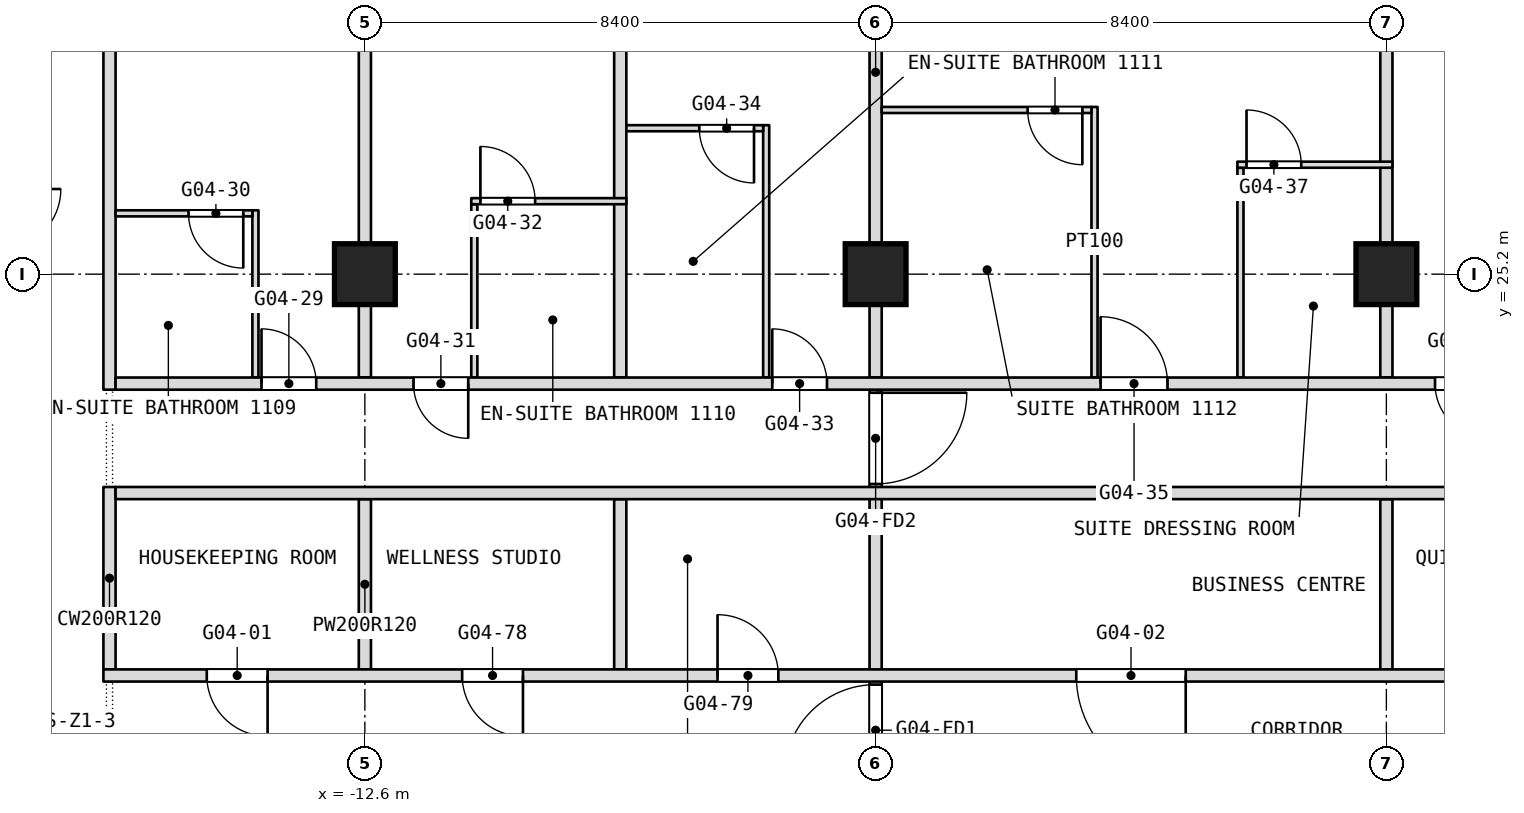
"""IFC4 building model, lengths in metres.
Left out: names, types, materials, properties, quantities, classifications, styles, units other than length and angle.
Written with IfcOpenShell. Run it as: python <this file> out.ifc"""

import sys

from ifc_helpers import new_model, si_unit, direction, frame, frame_2d, origin, origin_2d, place, context, subcontext, project, spatial, rectangle, extrude, element, fill, save


model = new_model("IFC4")
c1 = context("Model", 3, precision=1e-05, world=origin(), true_north=direction((0.0, 1.0)))
c2 = subcontext(c1, "Body", "Model", "MODEL_VIEW")
j1 = project(units=[si_unit("LENGTHUNIT", "METRE"), si_unit("PLANEANGLEUNIT", "RADIAN")], contexts=[c1])
p1 = place(None, origin())
s1 = spatial("IfcSite", under=j1, at=p1, CompositionType="ELEMENT")
p2 = place(p1, origin())
s2 = spatial("IfcBuilding", under=s1, at=p2, CompositionType="ELEMENT")
p3 = place(p2, frame((0.0, 0.0, 54.5)))
s3 = spatial("IfcBuildingStorey", under=s2, at=p3, CompositionType="ELEMENT", Elevation=54.5)
for number, where, z_axis, x_axis in (
    (1, (-12.6, 25.2, 0.0), (0.0, 0.0, 1.0), (1.0, 0.0, 0.0)),
    (2, (-4.2, 25.2, 0.0), (0.0, 0.0, 1.0), (1.0, 0.0, 0.0)),
    (3, (4.2, 25.2, 0.0), (0.0, 0.0, 1.0), (1.0, 0.0, 0.0)),
):
    element("IfcColumn", number, at=place(p3, frame(where, z_axis=z_axis, x_axis=x_axis)), inside=s3, PredefinedType="COLUMN", context=c2, shape_type="SweptSolid", body=[
        extrude(rectangle(XDim=1.0, YDim=1.0, at=origin_2d()), origin(), (0.0, 0.0, 1.0), 3.6),
    ])
p4 = place(p3, frame((4.2, 18.7, 0.0), z_axis=(0.0, 0.0, 1.0), x_axis=(0.0, 1.0, 0.0)))
e4 = element("IfcWall", 4, at=p4, inside=s3, PredefinedType="PARTITIONING", context=c2, shape_type="SweptSolid", body=[
    extrude(rectangle(XDim=2.8, YDim=0.2, at=frame_2d((1.4, 0.0))), origin(), (0.0, 0.0, 1.0), 3.34),
])
p5 = place(p3, frame((4.2, 23.5, 0.0), z_axis=(0.0, 0.0, 1.0), x_axis=(0.0, 1.0, 0.0)))
e5 = element("IfcWall", 5, at=p5, inside=s3, PredefinedType="PARTITIONING", context=c2, shape_type="SweptSolid", body=[
    extrude(rectangle(XDim=10.04, YDim=0.2, at=frame_2d((5.02, 0.0))), origin(), (0.0, 0.0, 1.0), 3.34),
])
p6 = place(p3, frame((1.8, 23.5, 0.0), z_axis=(0.0, 0.0, 1.0), x_axis=(0.0, 1.0, 0.0)))
e6 = element("IfcWall", 6, at=p6, inside=s3, PredefinedType="PARTITIONING", context=c2, shape_type="SweptSolid", body=[
    extrude(rectangle(XDim=3.45, YDim=0.1, at=frame_2d((1.725, 0.0))), origin(), (0.0, 0.0, 1.0), 3.34),
])
p7 = place(p3, frame((-0.6, 23.5, 0.0), z_axis=(0.0, 0.0, 1.0), x_axis=(0.0, 1.0, 0.0)))
e7 = element("IfcWall", 7, at=p7, inside=s3, PredefinedType="PARTITIONING", context=c2, shape_type="SweptSolid", body=[
    extrude(rectangle(XDim=4.45, YDim=0.1, at=frame_2d((2.225, 0.0))), origin(), (0.0, 0.0, 1.0), 3.34),
])
p8 = place(p3, frame((-4.2, 16.8, 0.0), z_axis=(0.0, 0.0, 1.0), x_axis=(0.0, 1.0, 0.0)))
e8 = element("IfcWall", 8, at=p8, inside=s3, PredefinedType="PARTITIONING", context=c2, shape_type="SweptSolid", body=[
    extrude(rectangle(XDim=6.7, YDim=0.2, at=frame_2d((3.35, 0.0))), origin(), (0.0, 0.0, 1.0), 3.34),
])
p9 = place(p8, frame((0.15, 0.0, 0.0)))
e9 = element("IfcOpeningElement", 9, at=p9, cuts=e8, PredefinedType="OPENING", context=c2, shape_type="SweptSolid", body=[
    extrude(rectangle(XDim=1.5, YDim=2.1, at=frame_2d((0.75, 1.05))), frame((0.0, 0.1, 0.0), z_axis=(0.0, -1.0, 0.0), x_axis=(1.0, 0.0, 0.0)), (0.0, 0.0, 1.0), 0.2),
])
p10 = place(p8, frame((4.95, 0.0, 0.0)))
e10 = element("IfcOpeningElement", 10, at=p10, cuts=e8, PredefinedType="OPENING", context=c2, shape_type="SweptSolid", body=[
    extrude(rectangle(XDim=1.5, YDim=2.1, at=frame_2d((0.75, 1.05))), frame((0.0, 0.1, 0.0), z_axis=(0.0, -1.0, 0.0), x_axis=(1.0, 0.0, 0.0)), (0.0, 0.0, 1.0), 0.2),
])
p11 = place(p3, frame((-4.2, 23.5, 0.0), z_axis=(0.0, 0.0, 1.0), x_axis=(0.0, 1.0, 0.0)))
e11 = element("IfcWall", 11, at=p11, inside=s3, PredefinedType="PARTITIONING", context=c2, shape_type="SweptSolid", body=[
    extrude(rectangle(XDim=10.04, YDim=0.2, at=frame_2d((5.02, 0.0))), origin(), (0.0, 0.0, 1.0), 3.34),
])
p12 = place(p3, frame((-6.0, 23.5, 0.0), z_axis=(0.0, 0.0, 1.0), x_axis=(0.0, 1.0, 0.0)))
e12 = element("IfcWall", 12, at=p12, inside=s3, PredefinedType="PARTITIONING", context=c2, shape_type="SweptSolid", body=[
    extrude(rectangle(XDim=4.15, YDim=0.1, at=frame_2d((2.075, 0.0))), origin(), (0.0, 0.0, 1.0), 3.34),
])
p13 = place(p3, frame((-8.4, 18.7, 0.0), z_axis=(0.0, 0.0, 1.0), x_axis=(0.0, 1.0, 0.0)))
e13 = element("IfcWall", 13, at=p13, inside=s3, PredefinedType="PARTITIONING", context=c2, shape_type="SweptSolid", body=[
    extrude(rectangle(XDim=2.8, YDim=0.2, at=frame_2d((1.4, 0.0))), origin(), (0.0, 0.0, 1.0), 3.34),
])
p14 = place(p3, frame((-8.4, 23.5, 0.0), z_axis=(0.0, 0.0, 1.0), x_axis=(0.0, 1.0, 0.0)))
e14 = element("IfcWall", 14, at=p14, inside=s3, PredefinedType="PARTITIONING", context=c2, shape_type="SweptSolid", body=[
    extrude(rectangle(XDim=10.04, YDim=0.2, at=frame_2d((5.02, 0.0))), origin(), (0.0, 0.0, 1.0), 3.34),
])
p15 = place(p3, frame((-10.8, 23.5, 0.0), z_axis=(0.0, 0.0, 1.0), x_axis=(0.0, 1.0, 0.0)))
e15 = element("IfcWall", 15, at=p15, inside=s3, PredefinedType="PARTITIONING", context=c2, shape_type="SweptSolid", body=[
    extrude(rectangle(XDim=2.85, YDim=0.1, at=frame_2d((1.425, 0.0))), origin(), (0.0, 0.0, 1.0), 3.34),
])
p16 = place(p3, frame((-12.6, 18.7, 0.0), z_axis=(0.0, 0.0, 1.0), x_axis=(0.0, 1.0, 0.0)))
e16 = element("IfcWall", 16, at=p16, inside=s3, PredefinedType="PARTITIONING", context=c2, shape_type="SweptSolid", body=[
    extrude(rectangle(XDim=2.8, YDim=0.2, at=frame_2d((1.4, 0.0))), origin(), (0.0, 0.0, 1.0), 3.34),
])
p17 = place(p3, frame((-12.6, 23.5, 0.0), z_axis=(0.0, 0.0, 1.0), x_axis=(0.0, 1.0, 0.0)))
e17 = element("IfcWall", 17, at=p17, inside=s3, PredefinedType="PARTITIONING", context=c2, shape_type="SweptSolid", body=[
    extrude(rectangle(XDim=10.04, YDim=0.2, at=frame_2d((5.02, 0.0))), origin(), (0.0, 0.0, 1.0), 3.34),
])
p18 = place(p3, frame((-14.4, 23.5, 0.0), z_axis=(0.0, 0.0, 1.0), x_axis=(0.0, 1.0, 0.0)))
e18 = element("IfcWall", 18, at=p18, inside=s3, PredefinedType="PARTITIONING", context=c2, shape_type="SweptSolid", body=[
    extrude(rectangle(XDim=2.75, YDim=0.1, at=frame_2d((1.375, 0.0))), origin(), (0.0, 0.0, 1.0), 3.34),
])
p19 = place(p3, frame((-16.8, 18.7, 0.0), z_axis=(0.0, 0.0, 1.0), x_axis=(0.0, 1.0, 0.0)))
e19 = element("IfcWall", 19, at=p19, inside=s3, PredefinedType="PARTITIONING", context=c2, shape_type="SweptSolid", body=[
    extrude(rectangle(XDim=3.0, YDim=0.2, at=frame_2d((1.5, 0.0))), origin(), (0.0, 0.0, 1.0), 3.34),
])
p20 = place(p3, frame((-16.8, 23.3, 0.0), z_axis=(0.0, 0.0, 1.0), x_axis=(0.0, 1.0, 0.0)))
e20 = element("IfcWall", 20, at=p20, inside=s3, PredefinedType="PARTITIONING", context=c2, shape_type="SweptSolid", body=[
    extrude(rectangle(XDim=10.24, YDim=0.2, at=frame_2d((5.12, 0.0))), origin(), (0.0, 0.0, 1.0), 3.34),
])
p21 = place(p3, frame((-16.9, 18.6, 0.0), z_axis=(0.0, 0.0, 1.0), x_axis=(1.0, 0.0, 0.0)))
e21 = element("IfcWall", 21, at=p21, inside=s3, PredefinedType="PARTITIONING", context=c2, shape_type="SweptSolid", body=[
    extrude(rectangle(XDim=25.1, YDim=0.2, at=frame_2d((12.55, 0.0))), origin(), (0.0, 0.0, 1.0), 3.34),
])
p22 = place(p21, frame((1.7, 0.0, 0.0)))
e22 = element("IfcOpeningElement", 22, at=p22, cuts=e21, PredefinedType="OPENING", context=c2, shape_type="SweptSolid", body=[
    extrude(rectangle(XDim=1.0, YDim=2.1, at=frame_2d((0.5, 1.05))), frame((0.0, 0.1, 0.0), z_axis=(0.0, -1.0, 0.0), x_axis=(1.0, 0.0, 0.0)), (0.0, 0.0, 1.0), 0.2),
])
p23 = place(p21, frame((16.0, 0.0, 0.0)))
e23 = element("IfcOpeningElement", 23, at=p23, cuts=e21, PredefinedType="OPENING", context=c2, shape_type="SweptSolid", body=[
    extrude(rectangle(XDim=1.8, YDim=2.1, at=frame_2d((0.9, 1.05))), frame((0.0, 0.1, 0.0), z_axis=(0.0, -1.0, 0.0), x_axis=(1.0, 0.0, 0.0)), (0.0, 0.0, 1.0), 0.2),
])
p24 = place(p21, frame((22.55, 0.0, 0.0)))
e24 = element("IfcOpeningElement", 24, at=p24, cuts=e21, PredefinedType="OPENING", context=c2, shape_type="SweptSolid", body=[
    extrude(rectangle(XDim=1.0, YDim=2.1, at=frame_2d((0.5, 1.05))), frame((0.0, 0.1, 0.0), z_axis=(0.0, -1.0, 0.0), x_axis=(1.0, 0.0, 0.0)), (0.0, 0.0, 1.0), 0.2),
])
p25 = place(p21, frame((5.9, 0.0, 0.0)))
e25 = element("IfcOpeningElement", 25, at=p25, cuts=e21, PredefinedType="OPENING", context=c2, shape_type="SweptSolid", body=[
    extrude(rectangle(XDim=1.0, YDim=2.1, at=frame_2d((0.5, 1.05))), frame((0.0, 0.1, 0.0), z_axis=(0.0, -1.0, 0.0), x_axis=(1.0, 0.0, 0.0)), (0.0, 0.0, 1.0), 0.2),
])
p26 = place(p21, frame((10.1, 0.0, 0.0)))
e26 = element("IfcOpeningElement", 26, at=p26, cuts=e21, PredefinedType="OPENING", context=c2, shape_type="SweptSolid", body=[
    extrude(rectangle(XDim=1.0, YDim=2.1, at=frame_2d((0.5, 1.05))), frame((0.0, 0.1, 0.0), z_axis=(0.0, -1.0, 0.0), x_axis=(1.0, 0.0, 0.0)), (0.0, 0.0, 1.0), 0.2),
])
p27 = place(p3, frame((-16.7, 21.6, 0.0), z_axis=(0.0, 0.0, 1.0), x_axis=(1.0, 0.0, 0.0)))
e27 = element("IfcWall", 27, at=p27, inside=s3, PredefinedType="PARTITIONING", context=c2, shape_type="SweptSolid", body=[
    extrude(rectangle(XDim=24.9, YDim=0.2, at=frame_2d((12.45, 0.0))), origin(), (0.0, 0.0, 1.0), 3.34),
])
p28 = place(p3, frame((-16.7, 23.4, 0.0), z_axis=(0.0, 0.0, 1.0), x_axis=(1.0, 0.0, 0.0)))
e28 = element("IfcWall", 28, at=p28, inside=s3, PredefinedType="PARTITIONING", context=c2, shape_type="SweptSolid", body=[
    extrude(rectangle(XDim=23.4, YDim=0.2, at=frame_2d((11.7, 0.0))), origin(), (0.0, 0.0, 1.0), 3.34),
])
p29 = place(p28, frame((2.4, 0.0, 0.0)))
e29 = element("IfcOpeningElement", 29, at=p29, cuts=e28, PredefinedType="OPENING", context=c2, shape_type="SweptSolid", body=[
    extrude(rectangle(XDim=0.9, YDim=2.1, at=frame_2d((0.45, 1.05))), frame((0.0, 0.1, 0.0), z_axis=(0.0, -1.0, 0.0), x_axis=(1.0, 0.0, 0.0)), (0.0, 0.0, 1.0), 0.2),
])
p30 = place(p28, frame((4.9, 0.0, 0.0)))
e30 = element("IfcOpeningElement", 30, at=p30, cuts=e28, PredefinedType="OPENING", context=c2, shape_type="SweptSolid", body=[
    extrude(rectangle(XDim=0.9, YDim=2.1, at=frame_2d((0.45, 1.05))), frame((0.0, 0.1, 0.0), z_axis=(0.0, -1.0, 0.0), x_axis=(1.0, 0.0, 0.0)), (0.0, 0.0, 1.0), 0.2),
])
p31 = place(p28, frame((10.8, 0.0, 0.0)))
e31 = element("IfcOpeningElement", 31, at=p31, cuts=e28, PredefinedType="OPENING", context=c2, shape_type="SweptSolid", body=[
    extrude(rectangle(XDim=0.9, YDim=2.1, at=frame_2d((0.45, 1.05))), frame((0.0, 0.1, 0.0), z_axis=(0.0, -1.0, 0.0), x_axis=(1.0, 0.0, 0.0)), (0.0, 0.0, 1.0), 0.2),
])
p32 = place(p28, frame((16.2, 0.0, 0.0)))
e32 = element("IfcOpeningElement", 32, at=p32, cuts=e28, PredefinedType="OPENING", context=c2, shape_type="SweptSolid", body=[
    extrude(rectangle(XDim=1.1, YDim=2.1, at=frame_2d((0.55, 1.05))), frame((0.0, 0.1, 0.0), z_axis=(0.0, -1.0, 0.0), x_axis=(1.0, 0.0, 0.0)), (0.0, 0.0, 1.0), 0.2),
])
p33 = place(p28, frame((21.7, 0.0, 0.0)))
e33 = element("IfcOpeningElement", 33, at=p33, cuts=e28, PredefinedType="OPENING", context=c2, shape_type="SweptSolid", body=[
    extrude(rectangle(XDim=0.9, YDim=2.1, at=frame_2d((0.45, 1.05))), frame((0.0, 0.1, 0.0), z_axis=(0.0, -1.0, 0.0), x_axis=(1.0, 0.0, 0.0)), (0.0, 0.0, 1.0), 0.2),
])
p34 = place(p3, frame((-16.7, 26.2, 0.0), z_axis=(0.0, 0.0, 1.0), x_axis=(1.0, 0.0, 0.0)))
e34 = element("IfcWall", 34, at=p34, inside=s3, PredefinedType="PARTITIONING", context=c2, shape_type="SweptSolid", body=[
    extrude(rectangle(XDim=2.25, YDim=0.1, at=frame_2d((1.125, 0.0))), origin(), (0.0, 0.0, 1.0), 3.34),
])
p35 = place(p34, frame((1.2, 0.0, 0.0)))
e35 = element("IfcOpeningElement", 35, at=p35, cuts=e34, PredefinedType="OPENING", context=c2, shape_type="SweptSolid", body=[
    extrude(rectangle(XDim=0.9, YDim=2.1, at=frame_2d((0.45, 1.05))), frame((0.0, 0.05, 0.0), z_axis=(0.0, -1.0, 0.0), x_axis=(1.0, 0.0, 0.0)), (0.0, 0.0, 1.0), 0.1),
])
p36 = place(p3, frame((-10.85, 26.4, 0.0), z_axis=(0.0, 0.0, 1.0), x_axis=(1.0, 0.0, 0.0)))
e36 = element("IfcWall", 36, at=p36, inside=s3, PredefinedType="PARTITIONING", context=c2, shape_type="SweptSolid", body=[
    extrude(rectangle(XDim=2.55, YDim=0.1, at=frame_2d((1.275, 0.0))), origin(), (0.0, 0.0, 1.0), 3.34),
])
p37 = place(p36, frame((0.15, 0.0, 0.0)))
e37 = element("IfcOpeningElement", 37, at=p37, cuts=e36, PredefinedType="OPENING", context=c2, shape_type="SweptSolid", body=[
    extrude(rectangle(XDim=0.9, YDim=2.1, at=frame_2d((0.45, 1.05))), frame((0.0, 0.05, 0.0), z_axis=(0.0, -1.0, 0.0), x_axis=(1.0, 0.0, 0.0)), (0.0, 0.0, 1.0), 0.1),
])
p38 = place(p3, frame((1.75, 27.0, 0.0), z_axis=(0.0, 0.0, 1.0), x_axis=(1.0, 0.0, 0.0)))
e38 = element("IfcWall", 38, at=p38, inside=s3, PredefinedType="PARTITIONING", context=c2, shape_type="SweptSolid", body=[
    extrude(rectangle(XDim=2.55, YDim=0.1, at=frame_2d((1.275, 0.0))), origin(), (0.0, 0.0, 1.0), 3.34),
])
p39 = place(p38, frame((0.15, 0.0, 0.0)))
e39 = element("IfcOpeningElement", 39, at=p39, cuts=e38, PredefinedType="OPENING", context=c2, shape_type="SweptSolid", body=[
    extrude(rectangle(XDim=0.9, YDim=2.1, at=frame_2d((0.45, 1.05))), frame((0.0, 0.05, 0.0), z_axis=(0.0, -1.0, 0.0), x_axis=(1.0, 0.0, 0.0)), (0.0, 0.0, 1.0), 0.1),
])
p40 = place(p3, frame((-8.3, 27.6, 0.0), z_axis=(0.0, 0.0, 1.0), x_axis=(1.0, 0.0, 0.0)))
e40 = element("IfcWall", 40, at=p40, inside=s3, PredefinedType="PARTITIONING", context=c2, shape_type="SweptSolid", body=[
    extrude(rectangle(XDim=2.25, YDim=0.1, at=frame_2d((1.125, 0.0))), origin(), (0.0, 0.0, 1.0), 3.34),
])
p41 = place(p40, frame((1.2, 0.0, 0.0)))
e41 = element("IfcOpeningElement", 41, at=p41, cuts=e40, PredefinedType="OPENING", context=c2, shape_type="SweptSolid", body=[
    extrude(rectangle(XDim=0.9, YDim=2.1, at=frame_2d((0.45, 1.05))), frame((0.0, 0.05, 0.0), z_axis=(0.0, -1.0, 0.0), x_axis=(1.0, 0.0, 0.0)), (0.0, 0.0, 1.0), 0.1),
])
p42 = place(p3, frame((-4.1, 27.9, 0.0), z_axis=(0.0, 0.0, 1.0), x_axis=(1.0, 0.0, 0.0)))
e42 = element("IfcWall", 42, at=p42, inside=s3, PredefinedType="PARTITIONING", context=c2, shape_type="SweptSolid", body=[
    extrude(rectangle(XDim=3.45, YDim=0.1, at=frame_2d((1.725, 0.0))), origin(), (0.0, 0.0, 1.0), 3.34),
])
p43 = place(p42, frame((2.4, 0.0, 0.0)))
e43 = element("IfcOpeningElement", 43, at=p43, cuts=e42, PredefinedType="OPENING", context=c2, shape_type="SweptSolid", body=[
    extrude(rectangle(XDim=0.9, YDim=2.1, at=frame_2d((0.45, 1.05))), frame((0.0, 0.05, 0.0), z_axis=(0.0, -1.0, 0.0), x_axis=(1.0, 0.0, 0.0)), (0.0, 0.0, 1.0), 0.1),
])
p44 = place(p22, origin())
e44 = element("IfcDoor", 44, at=p44, inside=s3, OperationType="SINGLE_SWING_RIGHT", PredefinedType="DOOR", context=c2, shape_type="SweptSolid", body=[
    extrude(rectangle(XDim=1.0, YDim=2.1, at=frame_2d((0.5, 1.05))), frame((0.0, 0.025, 0.0), z_axis=(0.0, -1.0, 0.0), x_axis=(1.0, 0.0, 0.0)), (0.0, 0.0, 1.0), 0.05),
])
fill(e22, e44)
p45 = place(p23, origin())
e45 = element("IfcDoor", 45, at=p45, inside=s3, OperationType="DOUBLE_DOOR_SINGLE_SWING", PredefinedType="DOOR", context=c2, shape_type="SweptSolid", body=[
    extrude(rectangle(XDim=1.8, YDim=2.1, at=frame_2d((0.9, 1.05))), frame((0.0, 0.025, 0.0), z_axis=(0.0, -1.0, 0.0), x_axis=(1.0, 0.0, 0.0)), (0.0, 0.0, 1.0), 0.05),
])
fill(e23, e45)
p46 = place(p25, origin())
e46 = element("IfcDoor", 46, at=p46, inside=s3, OperationType="SINGLE_SWING_RIGHT", PredefinedType="DOOR", context=c2, shape_type="SweptSolid", body=[
    extrude(rectangle(XDim=1.0, YDim=2.1, at=frame_2d((0.5, 1.05))), frame((0.0, 0.025, 0.0), z_axis=(0.0, -1.0, 0.0), x_axis=(1.0, 0.0, 0.0)), (0.0, 0.0, 1.0), 0.05),
])
fill(e25, e46)
p47 = place(p26, origin())
e47 = element("IfcDoor", 47, at=p47, inside=s3, OperationType="SINGLE_SWING_LEFT", PredefinedType="DOOR", context=c2, shape_type="SweptSolid", body=[
    extrude(rectangle(XDim=1.0, YDim=2.1, at=frame_2d((0.5, 1.05))), frame((0.0, 0.025, 0.0), z_axis=(0.0, -1.0, 0.0), x_axis=(1.0, 0.0, 0.0)), (0.0, 0.0, 1.0), 0.05),
])
fill(e26, e47)
p48 = place(p29, origin())
e48 = element("IfcDoor", 48, at=p48, inside=s3, OperationType="SINGLE_SWING_LEFT", PredefinedType="DOOR", context=c2, shape_type="SweptSolid", body=[
    extrude(rectangle(XDim=0.9, YDim=2.1, at=frame_2d((0.45, 1.05))), frame((0.0, 0.025, 0.0), z_axis=(0.0, -1.0, 0.0), x_axis=(1.0, 0.0, 0.0)), (0.0, 0.0, 1.0), 0.05),
])
fill(e29, e48)
p49 = place(p30, origin())
e49 = element("IfcDoor", 49, at=p49, inside=s3, OperationType="SINGLE_SWING_RIGHT", PredefinedType="DOOR", context=c2, shape_type="SweptSolid", body=[
    extrude(rectangle(XDim=0.9, YDim=2.1, at=frame_2d((0.45, 1.05))), frame((0.0, 0.025, 0.0), z_axis=(0.0, -1.0, 0.0), x_axis=(1.0, 0.0, 0.0)), (0.0, 0.0, 1.0), 0.05),
])
fill(e30, e49)
p50 = place(p31, origin())
e50 = element("IfcDoor", 50, at=p50, inside=s3, OperationType="SINGLE_SWING_LEFT", PredefinedType="DOOR", context=c2, shape_type="SweptSolid", body=[
    extrude(rectangle(XDim=0.9, YDim=2.1, at=frame_2d((0.45, 1.05))), frame((0.0, 0.025, 0.0), z_axis=(0.0, -1.0, 0.0), x_axis=(1.0, 0.0, 0.0)), (0.0, 0.0, 1.0), 0.05),
])
fill(e31, e50)
p51 = place(p32, origin())
e51 = element("IfcDoor", 51, at=p51, inside=s3, OperationType="SINGLE_SWING_LEFT", PredefinedType="DOOR", context=c2, shape_type="SweptSolid", body=[
    extrude(rectangle(XDim=1.1, YDim=2.1, at=frame_2d((0.55, 1.05))), frame((0.0, 0.025, 0.0), z_axis=(0.0, -1.0, 0.0), x_axis=(1.0, 0.0, 0.0)), (0.0, 0.0, 1.0), 0.05),
])
fill(e32, e51)
p52 = place(p33, origin())
e52 = element("IfcDoor", 52, at=p52, inside=s3, OperationType="SINGLE_SWING_RIGHT", PredefinedType="DOOR", context=c2, shape_type="SweptSolid", body=[
    extrude(rectangle(XDim=0.9, YDim=2.1, at=frame_2d((0.45, 1.05))), frame((0.0, 0.025, 0.0), z_axis=(0.0, -1.0, 0.0), x_axis=(1.0, 0.0, 0.0)), (0.0, 0.0, 1.0), 0.05),
])
fill(e33, e52)
p53 = place(p35, origin())
e53 = element("IfcDoor", 53, at=p53, inside=s3, OperationType="SINGLE_SWING_LEFT", PredefinedType="DOOR", context=c2, shape_type="SweptSolid", body=[
    extrude(rectangle(XDim=0.9, YDim=2.1, at=frame_2d((0.45, 1.05))), frame((0.0, 0.025, 0.0), z_axis=(0.0, -1.0, 0.0), x_axis=(1.0, 0.0, 0.0)), (0.0, 0.0, 1.0), 0.05),
])
fill(e35, e53)
p54 = place(p37, origin())
e54 = element("IfcDoor", 54, at=p54, inside=s3, OperationType="SINGLE_SWING_RIGHT", PredefinedType="DOOR", context=c2, shape_type="SweptSolid", body=[
    extrude(rectangle(XDim=0.9, YDim=2.1, at=frame_2d((0.45, 1.05))), frame((0.0, 0.025, 0.0), z_axis=(0.0, -1.0, 0.0), x_axis=(1.0, 0.0, 0.0)), (0.0, 0.0, 1.0), 0.05),
])
fill(e37, e54)
p55 = place(p39, origin())
e55 = element("IfcDoor", 55, at=p55, inside=s3, OperationType="SINGLE_SWING_RIGHT", PredefinedType="DOOR", context=c2, shape_type="SweptSolid", body=[
    extrude(rectangle(XDim=0.9, YDim=2.1, at=frame_2d((0.45, 1.05))), frame((0.0, 0.025, 0.0), z_axis=(0.0, -1.0, 0.0), x_axis=(1.0, 0.0, 0.0)), (0.0, 0.0, 1.0), 0.05),
])
fill(e39, e55)
p56 = place(p41, origin())
e56 = element("IfcDoor", 56, at=p56, inside=s3, OperationType="SINGLE_SWING_LEFT", PredefinedType="DOOR", context=c2, shape_type="SweptSolid", body=[
    extrude(rectangle(XDim=0.9, YDim=2.1, at=frame_2d((0.45, 1.05))), frame((0.0, 0.025, 0.0), z_axis=(0.0, -1.0, 0.0), x_axis=(1.0, 0.0, 0.0)), (0.0, 0.0, 1.0), 0.05),
])
fill(e41, e56)
p57 = place(p43, origin())
e57 = element("IfcDoor", 57, at=p57, inside=s3, OperationType="SINGLE_SWING_LEFT", PredefinedType="DOOR", context=c2, shape_type="SweptSolid", body=[
    extrude(rectangle(XDim=0.9, YDim=2.1, at=frame_2d((0.45, 1.05))), frame((0.0, 0.025, 0.0), z_axis=(0.0, -1.0, 0.0), x_axis=(1.0, 0.0, 0.0)), (0.0, 0.0, 1.0), 0.05),
])
fill(e43, e57)
p58 = place(p9, origin())
e58 = element("IfcDoor", 58, at=p58, inside=s3, OperationType="DOUBLE_DOOR_DOUBLE_SWING", PredefinedType="DOOR", context=c2, shape_type="SweptSolid", body=[
    extrude(rectangle(XDim=1.5, YDim=2.1, at=frame_2d((0.75, 1.05))), frame((0.0, 0.025, 0.0), z_axis=(0.0, -1.0, 0.0), x_axis=(1.0, 0.0, 0.0)), (0.0, 0.0, 1.0), 0.05),
])
fill(e9, e58)
p59 = place(p10, origin())
e59 = element("IfcDoor", 59, at=p59, inside=s3, OperationType="DOUBLE_DOOR_DOUBLE_SWING", PredefinedType="DOOR", context=c2, shape_type="SweptSolid", body=[
    extrude(rectangle(XDim=1.5, YDim=2.1, at=frame_2d((0.75, 1.05))), frame((0.0, 0.025, 0.0), z_axis=(0.0, -1.0, 0.0), x_axis=(1.0, 0.0, 0.0)), (0.0, 0.0, 1.0), 0.05),
])
fill(e10, e59)
save(model, sys.argv[1])
